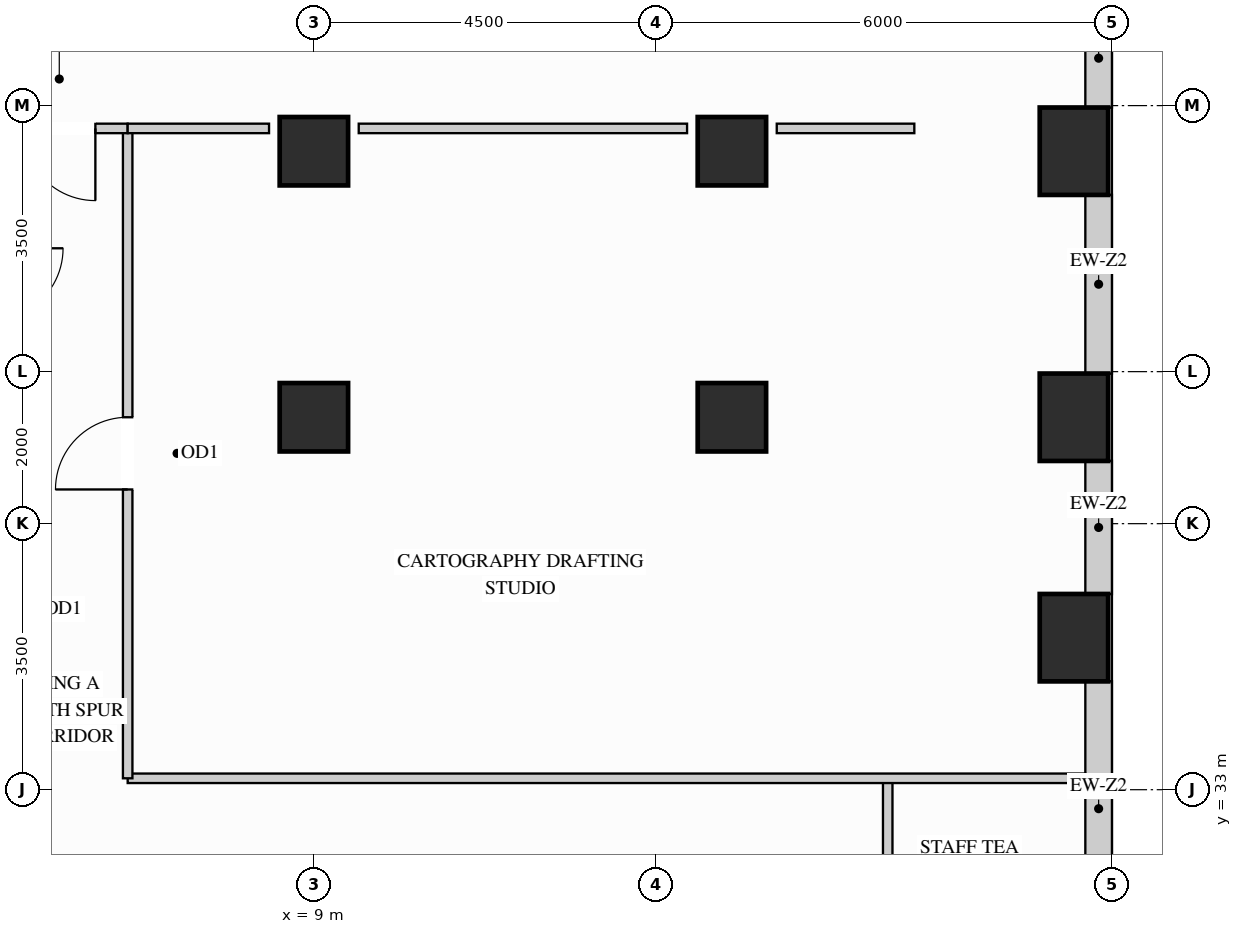
"""IFC4 building model, lengths in metres.
Left out: names, types, materials, properties, quantities, classifications, styles, units other than length and angle.
Written with IfcOpenShell. Run it as: python <this file> out.ifc"""

import sys

from ifc_helpers import new_model, si_unit, direction, frame, frame_2d, origin, origin_2d, place, context, subcontext, project, spatial, rectangle, extrude, source, transform, mapped, element, fill, save


model = new_model("IFC4")
c1 = context("Model", 3, precision=1e-05, world=origin(), true_north=direction((0.0, 1.0)))
c2 = subcontext(c1, "Body", "Model", "MODEL_VIEW")
j1 = project(units=[si_unit("LENGTHUNIT", "METRE"), si_unit("PLANEANGLEUNIT", "RADIAN")], contexts=[c1])
p1 = place(None, origin())
s1 = spatial("IfcSite", under=j1, at=p1, CompositionType="ELEMENT")
p2 = place(p1, origin())
s2 = spatial("IfcBuilding", under=s1, at=p2, CompositionType="ELEMENT")
p3 = place(p2, frame((0.0, 0.0, 109.8)))
s3 = spatial("IfcBuildingStorey", under=s2, at=p3, CompositionType="ELEMENT", Elevation=109.8)
m1 = source(origin(), c2, "Body", "SweptSolid", [
    extrude(rectangle(XDim=0.9, YDim=0.9, at=origin_2d()), origin(), (0.0, 0.0, 1.0), 3.38),
])
for number, where, z_axis, x_axis in (
    (1, (14.5, 37.9, 0.0), (0.0, 0.0, 1.0), (1.0, 0.0, 0.0)),
    (2, (14.5, 41.4, 0.0), (0.0, 0.0, 1.0), (1.0, 0.0, 0.0)),
    (3, (9.0, 37.9, 0.0), (0.0, 0.0, 1.0), (1.0, 0.0, 0.0)),
    (4, (9.0, 41.4, 0.0), (0.0, 0.0, 1.0), (1.0, 0.0, 0.0)),
):
    element("IfcColumn", number, at=place(p3, frame(where, z_axis=z_axis, x_axis=x_axis)), inside=s3, PredefinedType="COLUMN", context=c2, shape_type="MappedRepresentation", body=[
        mapped(m1, transform((0.0, 0.0, 0.0), x_axis=(1.0, 0.0, 0.0), y_axis=(0.0, 1.0, 0.0), z_axis=(0.0, 0.0, 1.0))),
    ])
m2 = source(origin(), c2, "Body", "SweptSolid", [
    extrude(rectangle(XDim=0.9, YDim=1.15, at=origin_2d()), origin(), (0.0, 0.0, 1.0), 3.38),
])
for number, where, z_axis, x_axis in (
    (5, (19.0, 35.0, 0.0), (0.0, 0.0, 1.0), (1.0, 0.0, 0.0)),
    (6, (19.0, 37.9, 0.0), (0.0, 0.0, 1.0), (1.0, 0.0, 0.0)),
    (7, (19.0, 41.4, 0.0), (0.0, 0.0, 1.0), (1.0, 0.0, 0.0)),
):
    element("IfcColumn", number, at=place(p3, frame(where, z_axis=z_axis, x_axis=x_axis)), inside=s3, PredefinedType="COLUMN", context=c2, shape_type="MappedRepresentation", body=[
        mapped(m2, transform((0.0, 0.0, 0.0), x_axis=(1.0, 0.0, 0.0), y_axis=(0.0, 1.0, 0.0), z_axis=(0.0, 0.0, 1.0))),
    ])
m3 = source(origin(), c2, "Body", "SweptSolid", [
    extrude(rectangle(XDim=3.354, YDim=0.35, at=frame_2d((1.677, 0.0))), origin(), (0.0, 0.0, 1.0), 2.519),
])
p4 = place(p3, frame((19.325, 31.073, 0.0), z_axis=(0.0, 0.0, 1.0), x_axis=(0.0, 1.0, 0.0)))
e8 = element("IfcWall", 8, at=p4, inside=s3, PredefinedType="SOLIDWALL", context=c2, shape_type="MappedRepresentation", body=[
    mapped(m3, transform((0.0, 0.0, 0.0), x_axis=(1.0, 0.0, 0.0), y_axis=(0.0, 1.0, 0.0), z_axis=(0.0, 0.0, 1.0))),
])
m4 = source(origin(), c2, "Body", "SweptSolid", [
    extrude(rectangle(XDim=1.754, YDim=0.35, at=frame_2d((0.877, 0.0))), origin(), (0.0, 0.0, 1.0), 2.519),
])
p5 = place(p3, frame((19.325, 35.573, 0.0), z_axis=(0.0, 0.0, 1.0), x_axis=(0.0, 1.0, 0.0)))
e9 = element("IfcWall", 9, at=p5, inside=s3, PredefinedType="SOLIDWALL", context=c2, shape_type="MappedRepresentation", body=[
    mapped(m4, transform((0.0, 0.0, 0.0), x_axis=(1.0, 0.0, 0.0), y_axis=(0.0, 1.0, 0.0), z_axis=(0.0, 0.0, 1.0))),
])
m5 = source(origin(), c2, "Body", "SweptSolid", [
    extrude(rectangle(XDim=2.354, YDim=0.35, at=frame_2d((1.177, 0.0))), origin(), (0.0, 0.0, 1.0), 2.519),
])
p6 = place(p3, frame((19.325, 38.473, 0.0), z_axis=(0.0, 0.0, 1.0), x_axis=(0.0, 1.0, 0.0)))
e10 = element("IfcWall", 10, at=p6, inside=s3, PredefinedType="SOLIDWALL", context=c2, shape_type="MappedRepresentation", body=[
    mapped(m5, transform((0.0, 0.0, 0.0), x_axis=(1.0, 0.0, 0.0), y_axis=(0.0, 1.0, 0.0), z_axis=(0.0, 0.0, 1.0))),
])
m6 = source(origin(), c2, "Body", "SweptSolid", [
    extrude(rectangle(XDim=1.179, YDim=0.35, at=frame_2d((0.59, 0.0))), origin(), (0.0, 0.0, 1.0), 3.365),
])
p7 = place(p3, frame((19.325, 41.973, 0.0), z_axis=(0.0, 0.0, 1.0), x_axis=(0.0, 1.0, 0.0)))
e11 = element("IfcWall", 11, at=p7, inside=s3, PredefinedType="SOLIDWALL", context=c2, shape_type="MappedRepresentation", body=[
    mapped(m6, transform((0.0, 0.0, 0.0), x_axis=(1.0, 0.0, 0.0), y_axis=(0.0, 1.0, 0.0), z_axis=(0.0, 0.0, 1.0))),
])
p8 = place(p3, frame((16.55, 26.05, 0.0), z_axis=(0.0, 0.0, 1.0), x_axis=(0.0, 1.0, 0.0)))
e12 = element("IfcWall", 12, at=p8, inside=s3, PredefinedType="PARTITIONING", context=c2, shape_type="SweptSolid", body=[
    extrude(rectangle(XDim=7.1, YDim=0.125, at=frame_2d((3.55, 0.0))), origin(), (0.0, 0.0, 1.0), 3.365),
])
p9 = place(p8, frame((3.075, 0.0, 0.0)))
e13 = element("IfcOpeningElement", 13, at=p9, cuts=e12, PredefinedType="OPENING", context=c2, shape_type="SweptSolid", body=[
    extrude(rectangle(XDim=0.95, YDim=2.15, at=frame_2d((0.475, 1.075))), frame((0.0, 0.073, 0.0), z_axis=(0.0, -1.0, 0.0), x_axis=(1.0, 0.0, 0.0)), (0.0, 0.0, 1.0), 0.145),
])
m7 = source(origin(), c2, "Body", "SweptSolid", [
    extrude(rectangle(XDim=12.598, YDim=0.125, at=frame_2d((6.299, 0.0))), origin(), (0.0, 0.0, 1.0), 3.365),
])
p10 = place(p3, frame((6.55, 33.15, 0.0), z_axis=(0.0, 0.0, 1.0), x_axis=(1.0, 0.0, 0.0)))
e14 = element("IfcWall", 14, at=p10, inside=s3, PredefinedType="PARTITIONING", context=c2, shape_type="MappedRepresentation", body=[
    mapped(m7, transform((0.0, 0.0, 0.0), x_axis=(1.0, 0.0, 0.0), y_axis=(0.0, 1.0, 0.0), z_axis=(0.0, 0.0, 1.0))),
])
p11 = place(p3, frame((6.55, 33.15, 0.0), z_axis=(0.0, 0.0, 1.0), x_axis=(0.0, 1.0, 0.0)))
e15 = element("IfcWall", 15, at=p11, inside=s3, PredefinedType="PARTITIONING", context=c2, shape_type="SweptSolid", body=[
    extrude(rectangle(XDim=8.55, YDim=0.125, at=frame_2d((4.275, 0.0))), origin(), (0.0, 0.0, 1.0), 3.365),
])
p12 = place(p11, frame((3.8, 0.0, 0.0)))
e16 = element("IfcOpeningElement", 16, at=p12, cuts=e15, PredefinedType="OPENING", context=c2, shape_type="SweptSolid", body=[
    extrude(rectangle(XDim=0.95, YDim=2.15, at=frame_2d((0.475, 1.075))), frame((0.0, 0.073, 0.0), z_axis=(0.0, -1.0, 0.0), x_axis=(1.0, 0.0, 0.0)), (0.0, 0.0, 1.0), 0.145),
])
p13 = place(p3, frame((4.75, 41.7, 0.0), z_axis=(0.0, 0.0, 1.0), x_axis=(1.0, 0.0, 0.0)))
e17 = element("IfcWall", 17, at=p13, inside=s3, PredefinedType="PARTITIONING", context=c2, shape_type="SweptSolid", body=[
    extrude(rectangle(XDim=1.8, YDim=0.125, at=frame_2d((0.9, 0.0))), origin(), (0.0, 0.0, 1.0), 3.365),
])
p14 = place(p13, frame((0.425, 0.0, 0.0)))
e18 = element("IfcOpeningElement", 18, at=p14, cuts=e17, PredefinedType="OPENING", context=c2, shape_type="SweptSolid", body=[
    extrude(rectangle(XDim=0.95, YDim=2.15, at=frame_2d((0.475, 1.075))), frame((0.0, 0.073, 0.0), z_axis=(0.0, -1.0, 0.0), x_axis=(1.0, 0.0, 0.0)), (0.0, 0.0, 1.0), 0.145),
])
m8 = source(origin(), c2, "Body", "SweptSolid", [
    extrude(rectangle(XDim=1.86, YDim=0.125, at=frame_2d((0.93, 0.0))), origin(), (0.0, 0.0, 1.0), 3.365),
])
p15 = place(p3, frame((6.55, 41.7, 0.0), z_axis=(0.0, 0.0, 1.0), x_axis=(1.0, 0.0, 0.0)))
e19 = element("IfcWall", 19, at=p15, inside=s3, PredefinedType="PARTITIONING", context=c2, shape_type="MappedRepresentation", body=[
    mapped(m8, transform((0.0, 0.0, 0.0), x_axis=(1.0, 0.0, 0.0), y_axis=(0.0, 1.0, 0.0), z_axis=(0.0, 0.0, 1.0))),
])
m9 = source(origin(), c2, "Body", "SweptSolid", [
    extrude(rectangle(XDim=4.32, YDim=0.125, at=frame_2d((2.16, 0.0))), origin(), (0.0, 0.0, 1.0), 3.365),
])
p16 = place(p3, frame((9.59, 41.7, 0.0), z_axis=(0.0, 0.0, 1.0), x_axis=(1.0, 0.0, 0.0)))
e20 = element("IfcWall", 20, at=p16, inside=s3, PredefinedType="PARTITIONING", context=c2, shape_type="MappedRepresentation", body=[
    mapped(m9, transform((0.0, 0.0, 0.0), x_axis=(1.0, 0.0, 0.0), y_axis=(0.0, 1.0, 0.0), z_axis=(0.0, 0.0, 1.0))),
])
m10 = source(origin(), c2, "Body", "SweptSolid", [
    extrude(rectangle(XDim=1.81, YDim=0.125, at=frame_2d((0.905, 0.0))), origin(), (0.0, 0.0, 1.0), 3.365),
])
p17 = place(p3, frame((15.09, 41.7, 0.0), z_axis=(0.0, 0.0, 1.0), x_axis=(1.0, 0.0, 0.0)))
e21 = element("IfcWall", 21, at=p17, inside=s3, PredefinedType="PARTITIONING", context=c2, shape_type="MappedRepresentation", body=[
    mapped(m10, transform((0.0, 0.0, 0.0), x_axis=(1.0, 0.0, 0.0), y_axis=(0.0, 1.0, 0.0), z_axis=(0.0, 0.0, 1.0))),
])
m11 = source(origin(), c2, "Body", "SweptSolid", [
    extrude(rectangle(XDim=0.95, YDim=2.15, at=frame_2d((0.475, 1.075))), frame((0.0, 0.025, 0.0), z_axis=(0.0, -1.0, 0.0), x_axis=(1.0, 0.0, 0.0)), (0.0, 0.0, 1.0), 0.05),
])
p18 = place(p12, origin())
e22 = element("IfcDoor", 22, at=p18, inside=s3, OperationType="SINGLE_SWING_LEFT", PredefinedType="DOOR", context=c2, shape_type="MappedRepresentation", body=[
    mapped(m11, transform((0.0, 0.0, 0.0), x_axis=(1.0, 0.0, 0.0), y_axis=(0.0, 1.0, 0.0), z_axis=(0.0, 0.0, 1.0))),
])
fill(e16, e22)
p19 = place(p14, origin())
e23 = element("IfcDoor", 23, at=p19, inside=s3, OperationType="SINGLE_SWING_RIGHT", PredefinedType="DOOR", context=c2, shape_type="MappedRepresentation", body=[
    mapped(m11, transform((0.0, 0.0, 0.0), x_axis=(1.0, 0.0, 0.0), y_axis=(0.0, 1.0, 0.0), z_axis=(0.0, 0.0, 1.0))),
])
fill(e18, e23)
save(model, sys.argv[1])
